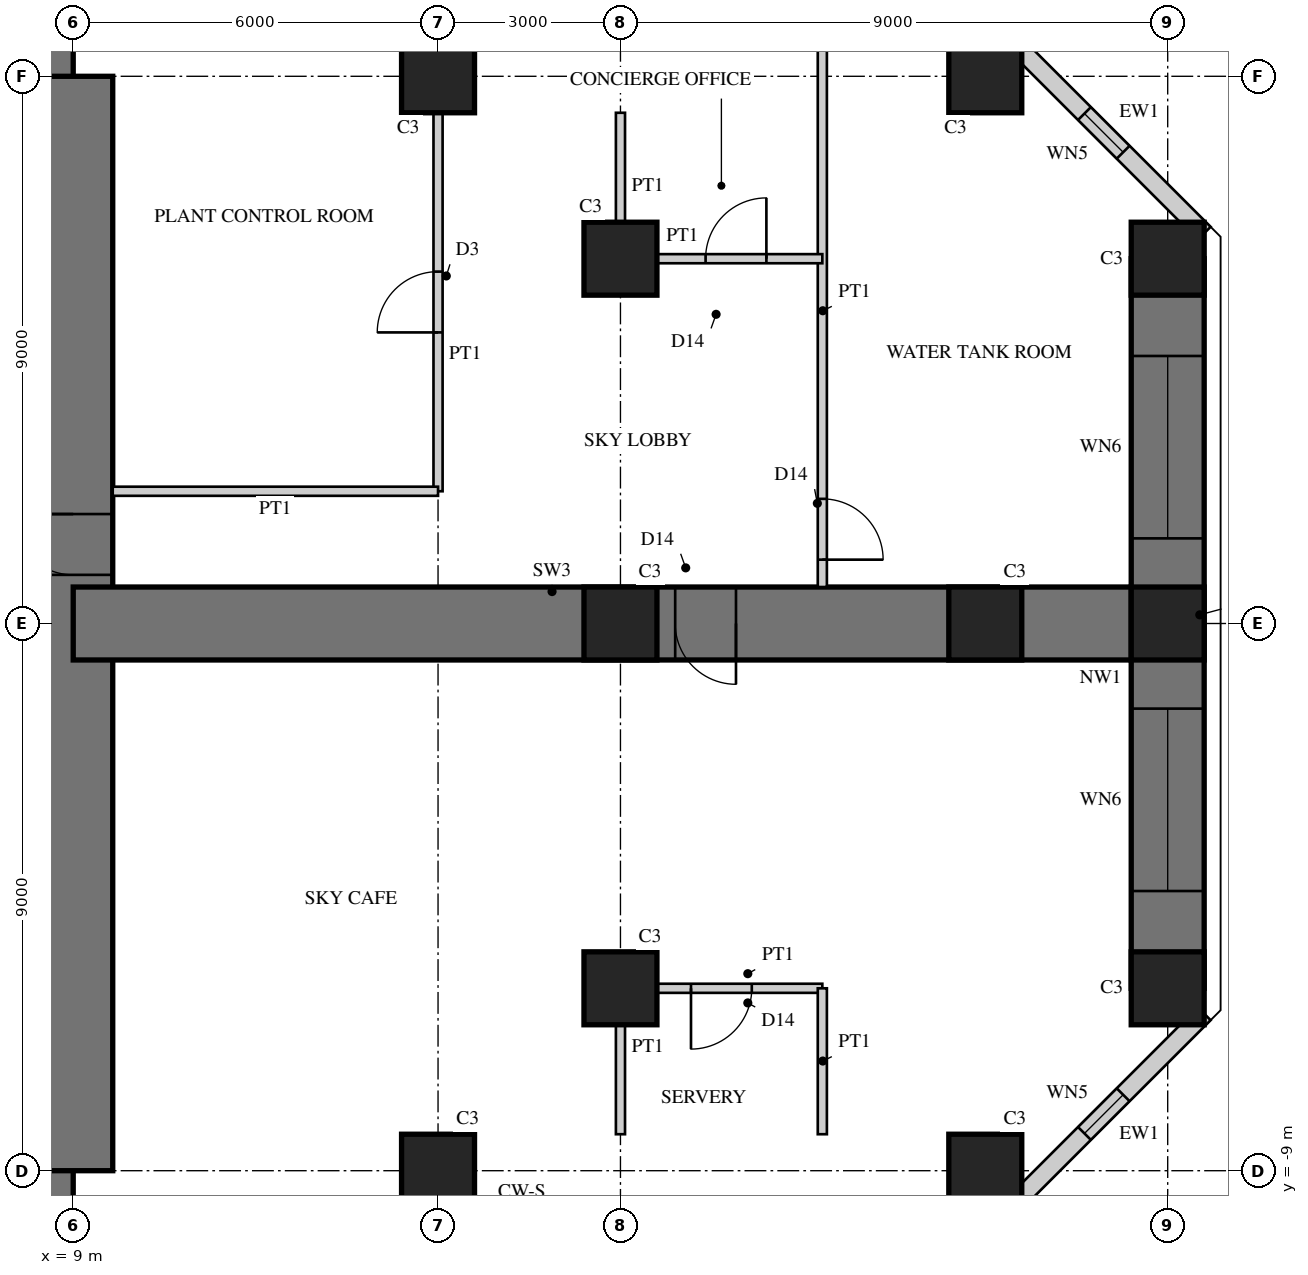
"""IFC4 building model, lengths in metres.
Left out: names, types, materials, properties, quantities, classifications, styles, units other than length and angle.
Written with IfcOpenShell. Run it as: python <this file> out.ifc"""

import sys

from ifc_helpers import new_model, si_unit, direction, frame, frame_2d, origin, origin_2d, place, context, subcontext, project, spatial, rectangle, hollow_rectangle, extrude, element, fill, save


model = new_model("IFC4")
c1 = context("Model", 3, precision=1e-05, world=origin(), true_north=direction((0.0, 1.0)))
c2 = subcontext(c1, "Body", "Model", "MODEL_VIEW")
j1 = project(units=[si_unit("LENGTHUNIT", "METRE"), si_unit("PLANEANGLEUNIT", "RADIAN")], contexts=[c1])
p1 = place(None, origin())
s1 = spatial("IfcSite", under=j1, at=p1, CompositionType="ELEMENT")
p2 = place(p1, origin())
s2 = spatial("IfcBuilding", under=s1, at=p2, CompositionType="ELEMENT")
p3 = place(p2, frame((0.0, 0.0, 95.5)))
s3 = spatial("IfcBuildingStorey", under=s2, at=p3, CompositionType="ELEMENT", Elevation=95.5)
p4 = place(p3, frame((9.0, 9.0, 0.0), z_axis=(0.0, 0.0, 1.0), x_axis=(-1.0, 0.0, 0.0)))
e1 = element("IfcWall", 1, at=p4, inside=s3, PredefinedType="SHEAR", context=c2, shape_type="SweptSolid", body=[
    extrude(rectangle(XDim=18.0, YDim=1.3, at=frame_2d((9.0, 0.0))), origin(), (0.0, 0.0, 1.0), 5.0),
])
p5 = place(p4, frame((9.8, 0.0, 0.0)))
e2 = element("IfcOpeningElement", 2, at=p5, cuts=e1, PredefinedType="OPENING", context=c2, shape_type="SweptSolid", body=[
    extrude(rectangle(XDim=1.0, YDim=2.4, at=frame_2d((0.5, 1.2))), frame((0.0, 0.66, 0.0), z_axis=(0.0, -1.0, 0.0), x_axis=(1.0, 0.0, 0.0)), (0.0, 0.0, 1.0), 1.32),
])
p6 = place(p3, frame((-9.0, -9.0, 0.0), z_axis=(0.0, 0.0, 1.0), x_axis=(1.0, 0.0, 0.0)))
e3 = element("IfcWall", 3, at=p6, inside=s3, PredefinedType="SHEAR", context=c2, shape_type="SweptSolid", body=[
    extrude(rectangle(XDim=18.0, YDim=1.3, at=frame_2d((9.0, 0.0))), origin(), (0.0, 0.0, 1.0), 5.0),
])
p7 = place(p6, frame((9.8, 0.0, 0.0)))
e4 = element("IfcOpeningElement", 4, at=p7, cuts=e3, PredefinedType="OPENING", context=c2, shape_type="SweptSolid", body=[
    extrude(rectangle(XDim=1.0, YDim=2.4, at=frame_2d((0.5, 1.2))), frame((0.0, 0.66, 0.0), z_axis=(0.0, -1.0, 0.0), x_axis=(1.0, 0.0, 0.0)), (0.0, 0.0, 1.0), 1.32),
])
p8 = place(p3, frame((9.0, -9.0, 0.0), z_axis=(0.0, 0.0, 1.0), x_axis=(0.0, 1.0, 0.0)))
e5 = element("IfcWall", 5, at=p8, inside=s3, PredefinedType="SHEAR", context=c2, shape_type="SweptSolid", body=[
    extrude(rectangle(XDim=18.0, YDim=1.3, at=frame_2d((9.0, 0.0))), origin(), (0.0, 0.0, 1.0), 5.0),
])
p9 = place(p8, frame((9.8, 0.0, 0.0)))
e6 = element("IfcOpeningElement", 6, at=p9, cuts=e5, PredefinedType="OPENING", context=c2, shape_type="SweptSolid", body=[
    extrude(rectangle(XDim=1.0, YDim=2.4, at=frame_2d((0.5, 1.2))), frame((0.0, 0.66, 0.0), z_axis=(0.0, -1.0, 0.0), x_axis=(1.0, 0.0, 0.0)), (0.0, 0.0, 1.0), 1.32),
])
p10 = place(p3, frame((9.0, 0.0, 0.0), z_axis=(0.0, 0.0, 1.0), x_axis=(1.0, 0.0, 0.0)))
e7 = element("IfcWall", 7, at=p10, inside=s3, PredefinedType="SHEAR", context=c2, shape_type="SweptSolid", body=[
    extrude(rectangle(XDim=18.0, YDim=1.2, at=frame_2d((9.0, 0.0))), origin(), (0.0, 0.0, 1.0), 5.0),
])
p11 = place(p10, frame((9.9, 0.0, 0.0)))
e8 = element("IfcOpeningElement", 8, at=p11, cuts=e7, PredefinedType="OPENING", context=c2, shape_type="SweptSolid", body=[
    extrude(rectangle(XDim=1.0, YDim=2.2, at=frame_2d((0.5, 1.1))), frame((0.0, 0.61, 0.0), z_axis=(0.0, -1.0, 0.0), x_axis=(1.0, 0.0, 0.0)), (0.0, 0.0, 1.0), 1.22),
])
p12 = place(p3, frame((27.0, -6.0, 0.0), z_axis=(0.0, 0.0, 1.0), x_axis=(0.0, 1.0, 0.0)))
e9 = element("IfcWall", 9, at=p12, inside=s3, PredefinedType="SHEAR", context=c2, shape_type="SweptSolid", body=[
    extrude(rectangle(XDim=12.0, YDim=1.2, at=frame_2d((6.0, 0.0))), origin(), (0.0, 0.0, 1.0), 5.0),
])
p13 = place(p12, frame((1.6, 0.0, 0.6)))
e10 = element("IfcOpeningElement", 10, at=p13, cuts=e9, PredefinedType="OPENING", context=c2, shape_type="SweptSolid", body=[
    extrude(rectangle(XDim=3.0, YDim=2.4, at=frame_2d((1.5, 1.2))), frame((0.0, 0.61, 0.0), z_axis=(0.0, -1.0, 0.0), x_axis=(1.0, 0.0, 0.0)), (0.0, 0.0, 1.0), 1.22),
])
p14 = place(p12, frame((7.4, 0.0, 0.6)))
e11 = element("IfcOpeningElement", 11, at=p14, cuts=e9, PredefinedType="OPENING", context=c2, shape_type="SweptSolid", body=[
    extrude(rectangle(XDim=3.0, YDim=2.4, at=frame_2d((1.5, 1.2))), frame((0.0, 0.61, 0.0), z_axis=(0.0, -1.0, 0.0), x_axis=(1.0, 0.0, 0.0)), (0.0, 0.0, 1.0), 1.22),
])
for number, where, z_axis, x_axis in (
    (12, (15.0, -9.0, 0.0), (0.0, 0.0, 1.0), (1.0, 0.0, 0.0)),
    (13, (24.0, -9.0, 0.0), (0.0, 0.0, 1.0), (1.0, 0.0, 0.0)),
    (14, (15.0, 9.0, 0.0), (0.0, 0.0, 1.0), (1.0, 0.0, 0.0)),
    (15, (24.0, 9.0, 0.0), (0.0, 0.0, 1.0), (1.0, 0.0, 0.0)),
    (16, (27.0, -6.0, 0.0), (0.0, 0.0, 1.0), (1.0, 0.0, 0.0)),
    (17, (27.0, 0.0, 0.0), (0.0, 0.0, 1.0), (1.0, 0.0, 0.0)),
    (18, (27.0, 6.0, 0.0), (0.0, 0.0, 1.0), (1.0, 0.0, 0.0)),
    (19, (18.0, -6.0, 0.0), (0.0, 0.0, 1.0), (1.0, 0.0, 0.0)),
    (20, (18.0, 0.0, 0.0), (0.0, 0.0, 1.0), (1.0, 0.0, 0.0)),
    (21, (18.0, 6.0, 0.0), (0.0, 0.0, 1.0), (1.0, 0.0, 0.0)),
    (22, (24.0, 0.0, 0.0), (0.0, 0.0, 1.0), (1.0, 0.0, 0.0)),
):
    element("IfcColumn", number, at=place(p3, frame(where, z_axis=z_axis, x_axis=x_axis)), inside=s3, PredefinedType="COLUMN", context=c2, shape_type="SweptSolid", body=[
        extrude(rectangle(XDim=1.2, YDim=1.2, at=origin_2d()), origin(), (0.0, 0.0, 1.0), 5.0),
    ])
p15 = place(p3, frame((24.298, -9.72, 0.0), z_axis=(0.0, 0.0, 1.0), x_axis=(0.707106781187, 0.707106781187, 0.0)))
e23 = element("IfcWall", 23, at=p15, inside=s3, PredefinedType="SOLIDWALL", context=c2, shape_type="SweptSolid", body=[
    extrude(rectangle(XDim=4.669, YDim=0.3, at=frame_2d((2.335, 0.0))), origin(), (0.0, 0.0, 1.0), 4.8),
])
p16 = place(p15, frame((1.885, 0.0, 0.3)))
e24 = element("IfcOpeningElement", 24, at=p16, cuts=e23, PredefinedType="OPENING", context=c2, shape_type="SweptSolid", body=[
    extrude(rectangle(XDim=0.9, YDim=2.4, at=frame_2d((0.45, 1.2))), frame((0.0, 0.16, 0.0), z_axis=(0.0, -1.0, 0.0), x_axis=(1.0, 0.0, 0.0)), (0.0, 0.0, 1.0), 0.32),
])
p17 = place(p3, frame((27.6, 6.418, 0.0), z_axis=(0.0, 0.0, 1.0), x_axis=(-0.707106781187, 0.707106781187, 0.0)))
e25 = element("IfcWall", 25, at=p17, inside=s3, PredefinedType="SOLIDWALL", context=c2, shape_type="SweptSolid", body=[
    extrude(rectangle(XDim=4.669, YDim=0.3, at=frame_2d((2.335, 0.0))), origin(), (0.0, 0.0, 1.0), 4.8),
])
p18 = place(p17, frame((1.885, 0.0, 0.3)))
e26 = element("IfcOpeningElement", 26, at=p18, cuts=e25, PredefinedType="OPENING", context=c2, shape_type="SweptSolid", body=[
    extrude(rectangle(XDim=0.9, YDim=2.4, at=frame_2d((0.45, 1.2))), frame((0.0, 0.16, 0.0), z_axis=(0.0, -1.0, 0.0), x_axis=(1.0, 0.0, 0.0)), (0.0, 0.0, 1.0), 0.32),
])
p19 = place(p3, frame((21.32, 0.6, 0.0), z_axis=(0.0, 0.0, 1.0), x_axis=(0.0, 1.0, 0.0)))
e27 = element("IfcWall", 27, at=p19, inside=s3, PredefinedType="PARTITIONING", context=c2, shape_type="SweptSolid", body=[
    extrude(rectangle(XDim=9.08, YDim=0.15, at=frame_2d((4.54, 0.0))), origin(), (0.0, 0.0, 1.0), 4.8),
])
p20 = place(p19, frame((0.45, 0.0, 0.0)))
e28 = element("IfcOpeningElement", 28, at=p20, cuts=e27, PredefinedType="OPENING", context=c2, shape_type="SweptSolid", body=[
    extrude(rectangle(XDim=1.0, YDim=2.2, at=frame_2d((0.5, 1.1))), frame((0.0, 0.085, 0.0), z_axis=(0.0, -1.0, 0.0), x_axis=(1.0, 0.0, 0.0)), (0.0, 0.0, 1.0), 0.17),
])
p21 = place(p3, frame((15.0, 2.175, 0.0), z_axis=(0.0, 0.0, 1.0), x_axis=(0.0, 1.0, 0.0)))
e29 = element("IfcWall", 29, at=p21, inside=s3, PredefinedType="PARTITIONING", context=c2, shape_type="SweptSolid", body=[
    extrude(rectangle(XDim=6.225, YDim=0.15, at=frame_2d((3.112, 0.0))), origin(), (0.0, 0.0, 1.0), 3.95),
])
p22 = place(p21, frame((2.613, 0.0, 0.0)))
e30 = element("IfcOpeningElement", 30, at=p22, cuts=e29, PredefinedType="OPENING", context=c2, shape_type="SweptSolid", body=[
    extrude(rectangle(XDim=1.0, YDim=2.1, at=frame_2d((0.5, 1.05))), frame((0.0, 0.085, 0.0), z_axis=(0.0, -1.0, 0.0), x_axis=(1.0, 0.0, 0.0)), (0.0, 0.0, 1.0), 0.17),
])
p23 = place(p3, frame((9.65, 2.175, 0.0), z_axis=(0.0, 0.0, 1.0), x_axis=(1.0, 0.0, 0.0)))
e31 = element("IfcWall", 31, at=p23, inside=s3, PredefinedType="PARTITIONING", context=c2, shape_type="SweptSolid", body=[
    extrude(rectangle(XDim=5.35, YDim=0.15, at=frame_2d((2.675, 0.0))), origin(), (0.0, 0.0, 1.0), 4.8),
])
p24 = place(p3, frame((18.0, -6.0, 0.0), z_axis=(0.0, 0.0, 1.0), x_axis=(1.0, 0.0, 0.0)))
e32 = element("IfcWall", 32, at=p24, inside=s3, PredefinedType="PARTITIONING", context=c2, shape_type="SweptSolid", body=[
    extrude(rectangle(XDim=3.32, YDim=0.15, at=frame_2d((1.66, 0.0))), origin(), (0.0, 0.0, 1.0), 4.0),
])
p25 = place(p24, frame((1.16, 0.0, 0.0)))
e33 = element("IfcOpeningElement", 33, at=p25, cuts=e32, PredefinedType="OPENING", context=c2, shape_type="SweptSolid", body=[
    extrude(rectangle(XDim=1.0, YDim=2.2, at=frame_2d((0.5, 1.1))), frame((0.0, 0.085, 0.0), z_axis=(0.0, -1.0, 0.0), x_axis=(1.0, 0.0, 0.0)), (0.0, 0.0, 1.0), 0.17),
])
p26 = place(p3, frame((18.0, -8.4, 0.0), z_axis=(0.0, 0.0, 1.0), x_axis=(0.0, 1.0, 0.0)))
e34 = element("IfcWall", 34, at=p26, inside=s3, PredefinedType="PARTITIONING", context=c2, shape_type="SweptSolid", body=[
    extrude(rectangle(XDim=2.4, YDim=0.15, at=frame_2d((1.2, 0.0))), origin(), (0.0, 0.0, 1.0), 3.95),
])
p27 = place(p3, frame((21.32, -8.4, 0.0), z_axis=(0.0, 0.0, 1.0), x_axis=(0.0, 1.0, 0.0)))
e35 = element("IfcWall", 35, at=p27, inside=s3, PredefinedType="PARTITIONING", context=c2, shape_type="SweptSolid", body=[
    extrude(rectangle(XDim=2.4, YDim=0.15, at=frame_2d((1.2, 0.0))), origin(), (0.0, 0.0, 1.0), 4.8),
])
p28 = place(p3, frame((18.0, 6.0, 0.0), z_axis=(0.0, 0.0, 1.0), x_axis=(1.0, 0.0, 0.0)))
e36 = element("IfcWall", 36, at=p28, inside=s3, PredefinedType="PARTITIONING", context=c2, shape_type="SweptSolid", body=[
    extrude(rectangle(XDim=3.32, YDim=0.15, at=frame_2d((1.66, 0.0))), origin(), (0.0, 0.0, 1.0), 4.0),
])
p29 = place(p28, frame((1.4, 0.0, 0.0)))
e37 = element("IfcOpeningElement", 37, at=p29, cuts=e36, PredefinedType="OPENING", context=c2, shape_type="SweptSolid", body=[
    extrude(rectangle(XDim=1.0, YDim=2.2, at=frame_2d((0.5, 1.1))), frame((0.0, 0.085, 0.0), z_axis=(0.0, -1.0, 0.0), x_axis=(1.0, 0.0, 0.0)), (0.0, 0.0, 1.0), 0.17),
])
p30 = place(p3, frame((18.0, 6.0, 0.0), z_axis=(0.0, 0.0, 1.0), x_axis=(0.0, 1.0, 0.0)))
e38 = element("IfcWall", 38, at=p30, inside=s3, PredefinedType="PARTITIONING", context=c2, shape_type="SweptSolid", body=[
    extrude(rectangle(XDim=2.4, YDim=0.15, at=frame_2d((1.2, 0.0))), origin(), (0.0, 0.0, 1.0), 3.95),
])
p31 = place(p16, origin())
e39 = element("IfcWindow", 39, at=p31, inside=s3, PartitioningType="SINGLE_PANEL", PredefinedType="WINDOW", context=c2, shape_type="SweptSolid", body=[
    extrude(hollow_rectangle(XDim=0.9, YDim=2.4, WallThickness=0.06, at=frame_2d((0.45, 1.2))), frame((0.0, 0.03, 0.0), z_axis=(0.0, -1.0, 0.0), x_axis=(1.0, 0.0, 0.0)), (0.0, 0.0, 1.0), 0.06),
    extrude(rectangle(XDim=0.779, YDim=2.279, at=frame_2d((0.45, 1.2))), frame((0.0, 0.03, 0.0), z_axis=(0.0, -1.0, 0.0), x_axis=(1.0, 0.0, 0.0)), (0.0, 0.0, 1.0), 0.06),
])
fill(e24, e39)
p32 = place(p13, origin())
e40 = element("IfcWindow", 40, at=p32, inside=s3, PartitioningType="SINGLE_PANEL", PredefinedType="WINDOW", context=c2, shape_type="SweptSolid", body=[
    extrude(hollow_rectangle(XDim=3.0, YDim=2.4, WallThickness=0.06, at=frame_2d((1.5, 1.2))), frame((0.0, 0.03, 0.0), z_axis=(0.0, -1.0, 0.0), x_axis=(1.0, 0.0, 0.0)), (0.0, 0.0, 1.0), 0.06),
    extrude(rectangle(XDim=2.879, YDim=2.279, at=frame_2d((1.5, 1.2))), frame((0.0, 0.03, 0.0), z_axis=(0.0, -1.0, 0.0), x_axis=(1.0, 0.0, 0.0)), (0.0, 0.0, 1.0), 0.06),
])
fill(e10, e40)
p33 = place(p14, origin())
e41 = element("IfcWindow", 41, at=p33, inside=s3, PartitioningType="SINGLE_PANEL", PredefinedType="WINDOW", context=c2, shape_type="SweptSolid", body=[
    extrude(hollow_rectangle(XDim=3.0, YDim=2.4, WallThickness=0.06, at=frame_2d((1.5, 1.2))), frame((0.0, 0.03, 0.0), z_axis=(0.0, -1.0, 0.0), x_axis=(1.0, 0.0, 0.0)), (0.0, 0.0, 1.0), 0.06),
    extrude(rectangle(XDim=2.879, YDim=2.279, at=frame_2d((1.5, 1.2))), frame((0.0, 0.03, 0.0), z_axis=(0.0, -1.0, 0.0), x_axis=(1.0, 0.0, 0.0)), (0.0, 0.0, 1.0), 0.06),
])
fill(e11, e41)
p34 = place(p18, origin())
e42 = element("IfcWindow", 42, at=p34, inside=s3, PartitioningType="SINGLE_PANEL", PredefinedType="WINDOW", context=c2, shape_type="SweptSolid", body=[
    extrude(hollow_rectangle(XDim=0.9, YDim=2.4, WallThickness=0.06, at=frame_2d((0.45, 1.2))), frame((0.0, 0.03, 0.0), z_axis=(0.0, -1.0, 0.0), x_axis=(1.0, 0.0, 0.0)), (0.0, 0.0, 1.0), 0.06),
    extrude(rectangle(XDim=0.779, YDim=2.279, at=frame_2d((0.45, 1.2))), frame((0.0, 0.03, 0.0), z_axis=(0.0, -1.0, 0.0), x_axis=(1.0, 0.0, 0.0)), (0.0, 0.0, 1.0), 0.06),
])
fill(e26, e42)
p35 = place(p20, frame((1.0, 0.0, 0.0), z_axis=(0.0, 0.0, 1.0), x_axis=(-1.0, 0.0, 0.0)))
e43 = element("IfcDoor", 43, at=p35, inside=s3, OperationType="SINGLE_SWING_RIGHT", PredefinedType="DOOR", context=c2, shape_type="SweptSolid", body=[
    extrude(rectangle(XDim=1.0, YDim=2.2, at=frame_2d((0.5, 1.1))), frame((0.0, 0.025, 0.0), z_axis=(0.0, -1.0, 0.0), x_axis=(1.0, 0.0, 0.0)), (0.0, 0.0, 1.0), 0.05),
])
fill(e28, e43)
p36 = place(p22, origin())
e44 = element("IfcDoor", 44, at=p36, inside=s3, OperationType="SINGLE_SWING_LEFT", PredefinedType="DOOR", context=c2, shape_type="SweptSolid", body=[
    extrude(rectangle(XDim=1.0, YDim=2.1, at=frame_2d((0.5, 1.05))), frame((0.0, 0.025, 0.0), z_axis=(0.0, -1.0, 0.0), x_axis=(1.0, 0.0, 0.0)), (0.0, 0.0, 1.0), 0.05),
])
fill(e30, e44)
p37 = place(p25, frame((1.0, 0.0, 0.0), z_axis=(0.0, 0.0, 1.0), x_axis=(-1.0, 0.0, 0.0)))
e45 = element("IfcDoor", 45, at=p37, inside=s3, OperationType="SINGLE_SWING_RIGHT", PredefinedType="DOOR", context=c2, shape_type="SweptSolid", body=[
    extrude(rectangle(XDim=1.0, YDim=2.2, at=frame_2d((0.5, 1.1))), frame((0.0, 0.025, 0.0), z_axis=(0.0, -1.0, 0.0), x_axis=(1.0, 0.0, 0.0)), (0.0, 0.0, 1.0), 0.05),
])
fill(e33, e45)
p38 = place(p29, origin())
e46 = element("IfcDoor", 46, at=p38, inside=s3, OperationType="SINGLE_SWING_RIGHT", PredefinedType="DOOR", context=c2, shape_type="SweptSolid", body=[
    extrude(rectangle(XDim=1.0, YDim=2.2, at=frame_2d((0.5, 1.1))), frame((0.0, 0.025, 0.0), z_axis=(0.0, -1.0, 0.0), x_axis=(1.0, 0.0, 0.0)), (0.0, 0.0, 1.0), 0.05),
])
fill(e37, e46)
p39 = place(p11, frame((1.0, 0.0, 0.0), z_axis=(0.0, 0.0, 1.0), x_axis=(-1.0, 0.0, 0.0)))
e47 = element("IfcDoor", 47, at=p39, inside=s3, OperationType="SINGLE_SWING_LEFT", PredefinedType="DOOR", context=c2, shape_type="SweptSolid", body=[
    extrude(rectangle(XDim=1.0, YDim=2.2, at=frame_2d((0.5, 1.1))), frame((0.0, 0.025, 0.0), z_axis=(0.0, -1.0, 0.0), x_axis=(1.0, 0.0, 0.0)), (0.0, 0.0, 1.0), 0.05),
])
fill(e8, e47)
p40 = place(p9, origin())
e48 = element("IfcDoor", 48, at=p40, inside=s3, OperationType="SINGLE_SWING_RIGHT", PredefinedType="DOOR", context=c2, shape_type="SweptSolid", body=[
    extrude(rectangle(XDim=1.0, YDim=2.4, at=frame_2d((0.5, 1.2))), frame((0.0, 0.055, 0.0), z_axis=(0.0, -1.0, 0.0), x_axis=(1.0, 0.0, 0.0)), (0.0, 0.0, 1.0), 0.05),
])
fill(e6, e48)
save(model, sys.argv[1])
